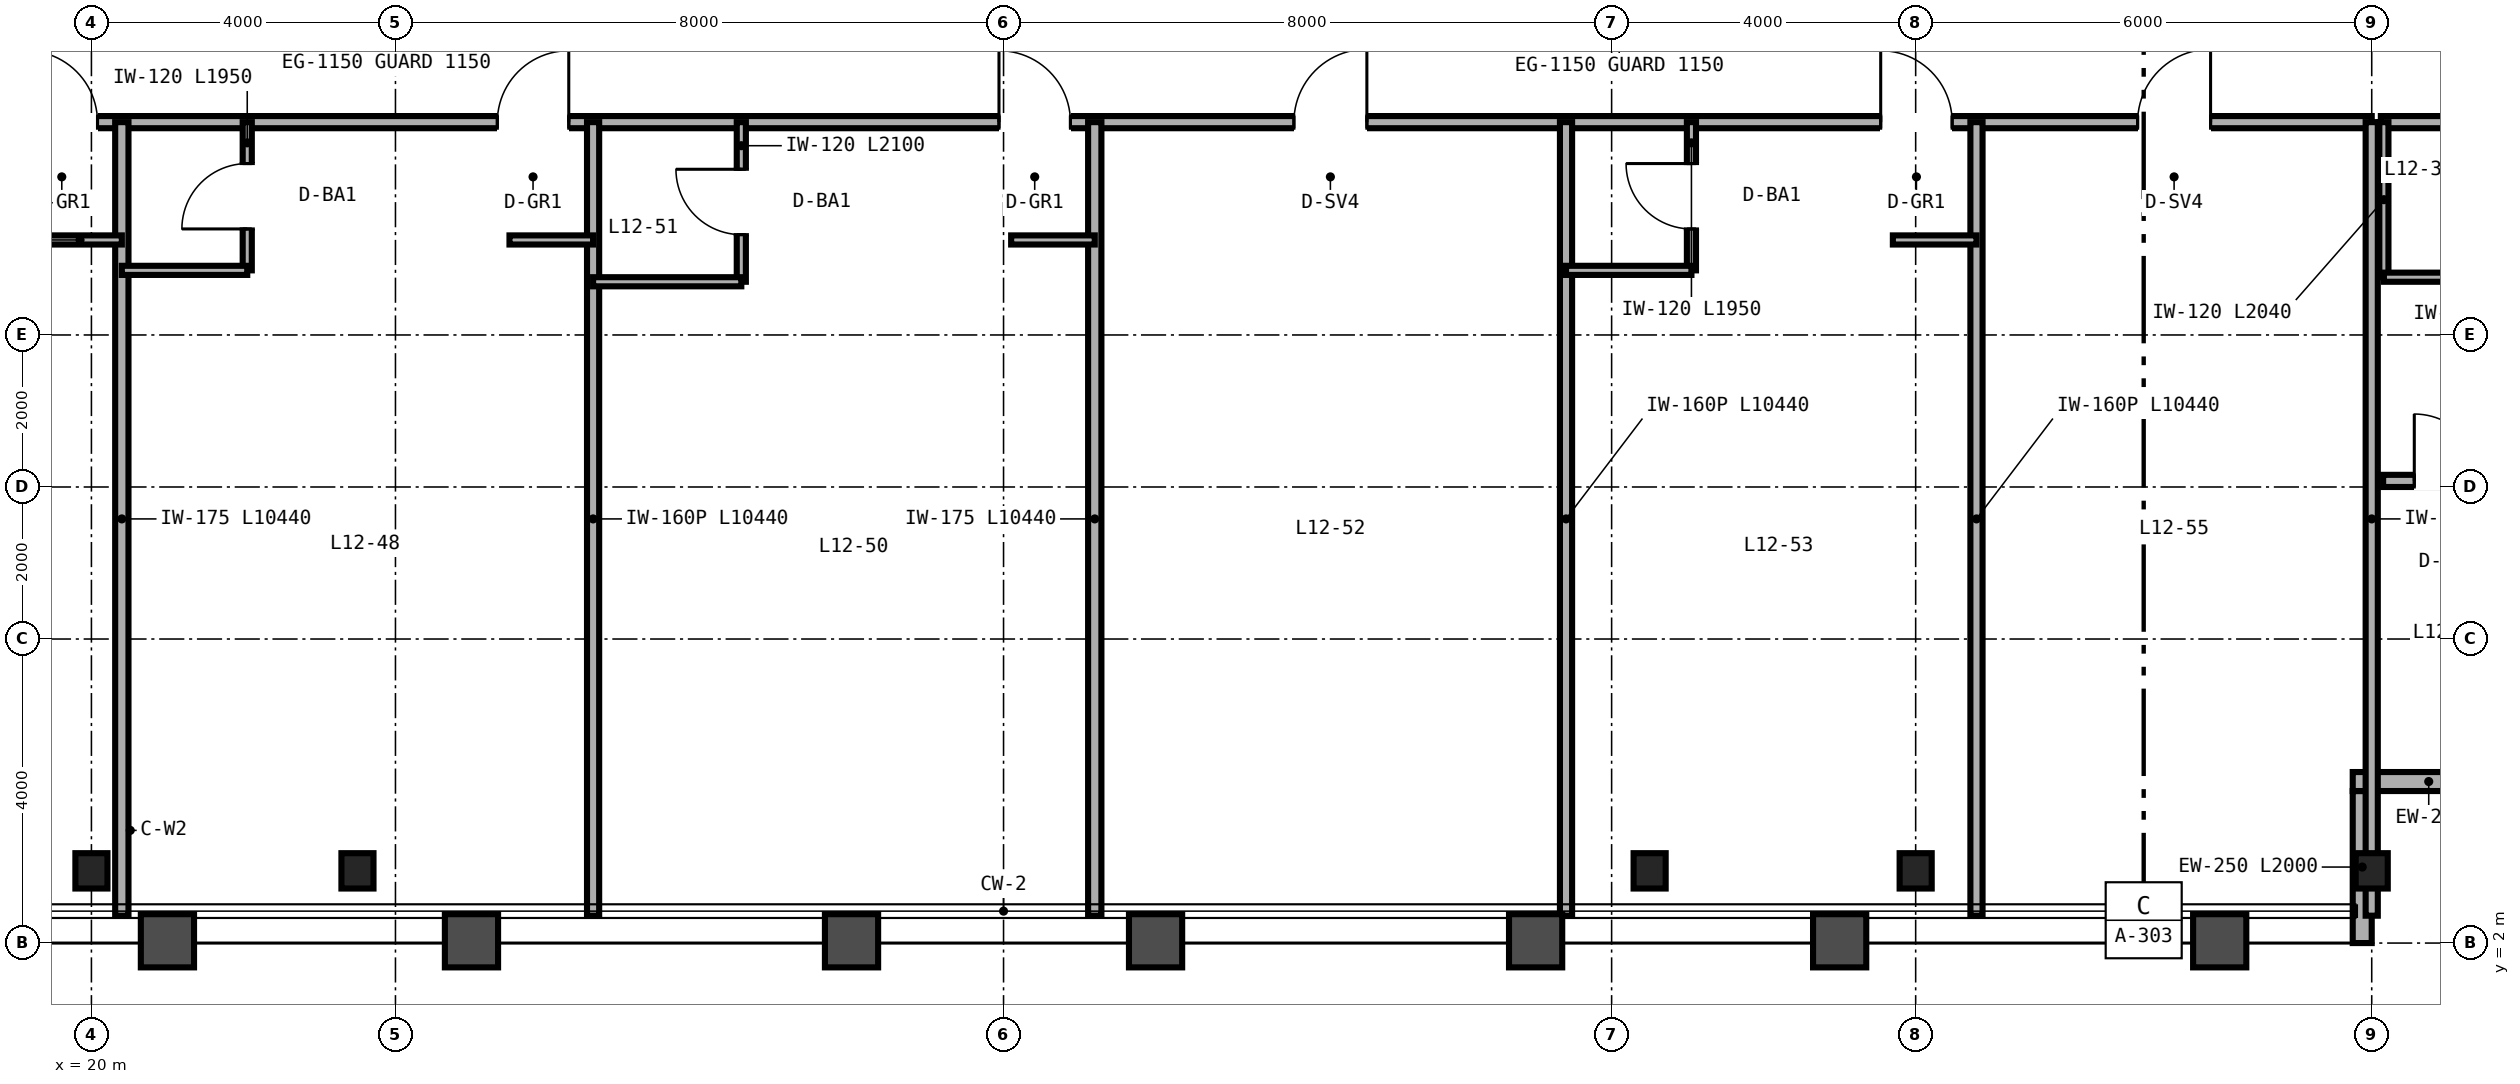
"""IFC4 building model, lengths in metres.
Left out: names, types, materials, properties, quantities, classifications, styles, units other than length and angle.
Written with IfcOpenShell. Run it as: python <this file> out.ifc"""

import sys

from ifc_helpers import new_model, si_unit, direction, frame, frame_2d, origin, origin_2d, place, context, subcontext, project, spatial, rectangle, i_section, extrude, source, transform, mapped, element, fill, save


model = new_model("IFC4")
c1 = context("Model", 3, precision=1e-05, world=origin(), true_north=direction((0.0, 1.0)))
c2 = subcontext(c1, "Body", "Model", "MODEL_VIEW")
j1 = project(units=[si_unit("LENGTHUNIT", "METRE"), si_unit("PLANEANGLEUNIT", "RADIAN")], contexts=[c1])
p1 = place(None, origin())
s1 = spatial("IfcSite", under=j1, at=p1, CompositionType="ELEMENT")
p2 = place(p1, origin())
s2 = spatial("IfcBuilding", under=s1, at=p2, CompositionType="ELEMENT")
p3 = place(p2, frame((0.0, 0.0, 52.8)))
s3 = spatial("IfcBuildingStorey", under=s2, at=p3, CompositionType="ELEMENT", Elevation=52.8)
m1 = source(origin(), c2, "Body", "SweptSolid", [
    extrude(i_section(OverallWidth=0.422, OverallDepth=0.465, WebThickness=0.045, FlangeThickness=0.073, FilletRadius=0.025, at=origin_2d()), origin(), (0.0, 0.0, 1.0), 3.35),
])
for number, where, z_axis, x_axis in (
    (1, (20.0, 2.95, 0.0), (0.0, 0.0, 1.0), (1.0, 0.0, 0.0)),
    (2, (23.5, 2.95, 0.0), (0.0, 0.0, 1.0), (1.0, 0.0, 0.0)),
    (3, (40.5, 2.95, 0.0), (0.0, 0.0, 1.0), (1.0, 0.0, 0.0)),
    (4, (44.0, 2.95, 0.0), (0.0, 0.0, 1.0), (1.0, 0.0, 0.0)),
    (5, (50.0, 2.95, 0.0), (0.0, 0.0, 1.0), (1.0, 0.0, 0.0)),
):
    element("IfcColumn", number, at=place(p3, frame(where, z_axis=z_axis, x_axis=x_axis)), inside=s3, PredefinedType="COLUMN", context=c2, shape_type="MappedRepresentation", body=[
        mapped(m1, transform((0.0, 0.0, 0.0), scale=1.0)),
    ])
p4 = place(p3, frame((49.875, 2.0, 0.0), z_axis=(0.0, 0.0, 1.0), x_axis=(0.0, 1.0, 0.0)))
e6 = element("IfcWall", 6, at=p4, inside=s3, PredefinedType="SOLIDWALL", context=c2, shape_type="SweptSolid", body=[
    extrude(rectangle(XDim=2.0, YDim=0.25, at=frame_2d((1.0, 0.0))), origin(), (0.0, 0.0, 1.0), 2.657),
])
p5 = place(p3, frame((49.75, 4.125, 0.0), z_axis=(0.0, 0.0, 1.0), x_axis=(1.0, 0.0, 0.0)))
e7 = element("IfcWall", 7, at=p5, inside=s3, PredefinedType="SOLIDWALL", context=c2, shape_type="SweptSolid", body=[
    extrude(rectangle(XDim=2.0, YDim=0.25, at=frame_2d((1.0, 0.0))), origin(), (0.0, 0.0, 1.0), 3.35),
])
p6 = place(p3, frame((50.12, 12.8, 0.0), z_axis=(0.0, 0.0, 1.0), x_axis=(1.0, 0.0, 0.0)))
e8 = element("IfcWall", 8, at=p6, inside=s3, PredefinedType="PARTITIONING", context=c2, shape_type="SweptSolid", body=[
    extrude(rectangle(XDim=5.68, YDim=0.16, at=frame_2d((2.84, 0.0))), origin(), (0.0, 0.0, 1.0), 3.35),
])
p7 = place(p6, frame((3.15, 0.0, 0.0)))
e9 = element("IfcOpeningElement", 9, at=p7, cuts=e8, PredefinedType="OPENING", context=c2, shape_type="SweptSolid", body=[
    extrude(rectangle(XDim=0.94, YDim=2.15, at=frame_2d((0.47, 1.075))), frame((0.0, 0.09, 0.0), z_axis=(0.0, -1.0, 0.0), x_axis=(1.0, 0.0, 0.0)), (0.0, 0.0, 1.0), 0.18),
])
p8 = place(p3, frame((50.16, 10.76, 0.0), z_axis=(0.0, 0.0, 1.0), x_axis=(0.0, 1.0, 0.0)))
e10 = element("IfcWall", 10, at=p8, inside=s3, PredefinedType="PARTITIONING", context=c2, shape_type="SweptSolid", body=[
    extrude(rectangle(XDim=2.04, YDim=0.12, at=frame_2d((1.02, 0.0))), origin(), (0.0, 0.0, 1.0), 3.35),
])
p9 = place(p3, frame((50.16, 10.76, 0.0), z_axis=(0.0, 0.0, 1.0), x_axis=(1.0, 0.0, 0.0)))
e11 = element("IfcWall", 11, at=p9, inside=s3, PredefinedType="PARTITIONING", context=c2, shape_type="SweptSolid", body=[
    extrude(rectangle(XDim=1.65, YDim=0.12, at=frame_2d((0.825, 0.0))), origin(), (0.0, 0.0, 1.0), 3.35),
])
p10 = place(p3, frame((50.15, 8.08, 0.0), z_axis=(0.0, 0.0, 1.0), x_axis=(1.0, 0.0, 0.0)))
e12 = element("IfcWall", 12, at=p10, inside=s3, PredefinedType="PARTITIONING", context=c2, shape_type="SweptSolid", body=[
    extrude(rectangle(XDim=1.7, YDim=0.16, at=frame_2d((0.85, 0.0))), origin(), (0.0, 0.0, 1.0), 3.35),
])
p11 = place(p10, frame((0.41, 0.0, 0.0)))
e13 = element("IfcOpeningElement", 13, at=p11, cuts=e12, PredefinedType="OPENING", context=c2, shape_type="SweptSolid", body=[
    extrude(rectangle(XDim=0.88, YDim=2.15, at=frame_2d((0.44, 1.075))), frame((0.0, 0.09, 0.0), z_axis=(0.0, -1.0, 0.0), x_axis=(1.0, 0.0, 0.0)), (0.0, 0.0, 1.0), 0.18),
])
p12 = place(p3, frame((14.0, 12.8, 0.0), z_axis=(0.0, 0.0, 1.0), x_axis=(1.0, 0.0, 0.0)))
e14 = element("IfcWall", 14, at=p12, inside=s3, PredefinedType="PARTITIONING", context=c2, shape_type="SweptSolid", body=[
    extrude(rectangle(XDim=36.0, YDim=0.16, at=frame_2d((18.0, 0.0))), origin(), (0.0, 0.0, 1.0), 2.571),
])
p13 = place(p12, frame((5.14, 0.0, 0.0)))
e15 = element("IfcOpeningElement", 15, at=p13, cuts=e14, PredefinedType="OPENING", context=c2, shape_type="SweptSolid", body=[
    extrude(rectangle(XDim=0.94, YDim=2.15, at=frame_2d((0.47, 1.075))), frame((0.0, 0.09, 0.0), z_axis=(0.0, -1.0, 0.0), x_axis=(1.0, 0.0, 0.0)), (0.0, 0.0, 1.0), 0.18),
])
p14 = place(p12, frame((11.34, 0.0, 0.0)))
e16 = element("IfcOpeningElement", 16, at=p14, cuts=e14, PredefinedType="OPENING", context=c2, shape_type="SweptSolid", body=[
    extrude(rectangle(XDim=0.94, YDim=2.15, at=frame_2d((0.47, 1.075))), frame((0.0, 0.09, 0.0), z_axis=(0.0, -1.0, 0.0), x_axis=(1.0, 0.0, 0.0)), (0.0, 0.0, 1.0), 0.18),
])
p15 = place(p12, frame((17.94, 0.0, 0.0)))
e17 = element("IfcOpeningElement", 17, at=p15, cuts=e14, PredefinedType="OPENING", context=c2, shape_type="SweptSolid", body=[
    extrude(rectangle(XDim=0.94, YDim=2.15, at=frame_2d((0.47, 1.075))), frame((0.0, 0.09, 0.0), z_axis=(0.0, -1.0, 0.0), x_axis=(1.0, 0.0, 0.0)), (0.0, 0.0, 1.0), 0.18),
])
p16 = place(p12, frame((21.82, 0.0, 0.0)))
e18 = element("IfcOpeningElement", 18, at=p16, cuts=e14, PredefinedType="OPENING", context=c2, shape_type="SweptSolid", body=[
    extrude(rectangle(XDim=0.96, YDim=2.15, at=frame_2d((0.48, 1.075))), frame((0.0, 0.09, 0.0), z_axis=(0.0, -1.0, 0.0), x_axis=(1.0, 0.0, 0.0)), (0.0, 0.0, 1.0), 0.18),
])
p17 = place(p12, frame((29.54, 0.0, 0.0)))
e19 = element("IfcOpeningElement", 19, at=p17, cuts=e14, PredefinedType="OPENING", context=c2, shape_type="SweptSolid", body=[
    extrude(rectangle(XDim=0.94, YDim=2.15, at=frame_2d((0.47, 1.075))), frame((0.0, 0.09, 0.0), z_axis=(0.0, -1.0, 0.0), x_axis=(1.0, 0.0, 0.0)), (0.0, 0.0, 1.0), 0.18),
])
p18 = place(p12, frame((32.92, 0.0, 0.0)))
e20 = element("IfcOpeningElement", 20, at=p18, cuts=e14, PredefinedType="OPENING", context=c2, shape_type="SweptSolid", body=[
    extrude(rectangle(XDim=0.96, YDim=2.15, at=frame_2d((0.48, 1.075))), frame((0.0, 0.09, 0.0), z_axis=(0.0, -1.0, 0.0), x_axis=(1.0, 0.0, 0.0)), (0.0, 0.0, 1.0), 0.18),
])
p19 = place(p3, frame((50.0, 2.36, 0.0), z_axis=(0.0, 0.0, 1.0), x_axis=(0.0, 1.0, 0.0)))
e21 = element("IfcWall", 21, at=p19, inside=s3, PredefinedType="PARTITIONING", context=c2, shape_type="SweptSolid", body=[
    extrude(rectangle(XDim=10.44, YDim=0.16, at=frame_2d((5.22, 0.0))), origin(), (0.0, 0.0, 1.0), 2.657),
])
p20 = place(p3, frame((20.4, 2.36, 0.0), z_axis=(0.0, 0.0, 1.0), x_axis=(0.0, 1.0, 0.0)))
e22 = element("IfcWall", 22, at=p20, inside=s3, PredefinedType="PARTITIONING", context=c2, shape_type="SweptSolid", body=[
    extrude(rectangle(XDim=10.44, YDim=0.175, at=frame_2d((5.22, 0.0))), origin(), (0.0, 0.0, 1.0), 2.813),
])
p21 = place(p3, frame((19.3, 11.25, 0.0), z_axis=(0.0, 0.0, 1.0), x_axis=(1.0, 0.0, 0.0)))
e23 = element("IfcWall", 23, at=p21, inside=s3, PredefinedType="PARTITIONING", context=c2, shape_type="SweptSolid", body=[
    extrude(rectangle(XDim=1.1, YDim=0.12, at=frame_2d((0.55, 0.0))), origin(), (0.0, 0.0, 1.0), 3.35),
])
p22 = place(p3, frame((26.6, 2.36, 0.0), z_axis=(0.0, 0.0, 1.0), x_axis=(0.0, 1.0, 0.0)))
e24 = element("IfcWall", 24, at=p22, inside=s3, PredefinedType="PARTITIONING", context=c2, shape_type="SweptSolid", body=[
    extrude(rectangle(XDim=10.44, YDim=0.16, at=frame_2d((5.22, 0.0))), origin(), (0.0, 0.0, 1.0), 2.423),
])
p23 = place(p3, frame((22.05, 10.85, 0.0), z_axis=(0.0, 0.0, 1.0), x_axis=(0.0, 1.0, 0.0)))
e25 = element("IfcWall", 25, at=p23, inside=s3, PredefinedType="PARTITIONING", context=c2, shape_type="SweptSolid", body=[
    extrude(rectangle(XDim=1.95, YDim=0.12, at=frame_2d((0.975, 0.0))), origin(), (0.0, 0.0, 1.0), 3.35),
])
p24 = place(p23, frame((0.545, 0.0, 0.0)))
e26 = element("IfcOpeningElement", 26, at=p24, cuts=e25, PredefinedType="OPENING", context=c2, shape_type="SweptSolid", body=[
    extrude(rectangle(XDim=0.86, YDim=2.1, at=frame_2d((0.43, 1.05))), frame((0.0, 0.07, 0.0), z_axis=(0.0, -1.0, 0.0), x_axis=(1.0, 0.0, 0.0)), (0.0, 0.0, 1.0), 0.14),
])
p25 = place(p3, frame((20.4, 10.85, 0.0), z_axis=(0.0, 0.0, 1.0), x_axis=(1.0, 0.0, 0.0)))
e27 = element("IfcWall", 27, at=p25, inside=s3, PredefinedType="PARTITIONING", context=c2, shape_type="SweptSolid", body=[
    extrude(rectangle(XDim=1.65, YDim=0.12, at=frame_2d((0.825, 0.0))), origin(), (0.0, 0.0, 1.0), 3.35),
])
p26 = place(p3, frame((25.5, 11.25, 0.0), z_axis=(0.0, 0.0, 1.0), x_axis=(1.0, 0.0, 0.0)))
e28 = element("IfcWall", 28, at=p26, inside=s3, PredefinedType="PARTITIONING", context=c2, shape_type="SweptSolid", body=[
    extrude(rectangle(XDim=1.1, YDim=0.12, at=frame_2d((0.55, 0.0))), origin(), (0.0, 0.0, 1.0), 3.35),
])
p27 = place(p3, frame((33.2, 2.36, 0.0), z_axis=(0.0, 0.0, 1.0), x_axis=(0.0, 1.0, 0.0)))
e29 = element("IfcWall", 29, at=p27, inside=s3, PredefinedType="PARTITIONING", context=c2, shape_type="SweptSolid", body=[
    extrude(rectangle(XDim=10.44, YDim=0.175, at=frame_2d((5.22, 0.0))), origin(), (0.0, 0.0, 1.0), 2.423),
])
p28 = place(p3, frame((28.55, 10.7, 0.0), z_axis=(0.0, 0.0, 1.0), x_axis=(0.0, 1.0, 0.0)))
e30 = element("IfcWall", 30, at=p28, inside=s3, PredefinedType="PARTITIONING", context=c2, shape_type="SweptSolid", body=[
    extrude(rectangle(XDim=2.1, YDim=0.12, at=frame_2d((1.05, 0.0))), origin(), (0.0, 0.0, 1.0), 3.35),
])
p29 = place(p28, frame((0.62, 0.0, 0.0)))
e31 = element("IfcOpeningElement", 31, at=p29, cuts=e30, PredefinedType="OPENING", context=c2, shape_type="SweptSolid", body=[
    extrude(rectangle(XDim=0.86, YDim=2.1, at=frame_2d((0.43, 1.05))), frame((0.0, 0.07, 0.0), z_axis=(0.0, -1.0, 0.0), x_axis=(1.0, 0.0, 0.0)), (0.0, 0.0, 1.0), 0.14),
])
p30 = place(p3, frame((26.6, 10.7, 0.0), z_axis=(0.0, 0.0, 1.0), x_axis=(1.0, 0.0, 0.0)))
e32 = element("IfcWall", 32, at=p30, inside=s3, PredefinedType="PARTITIONING", context=c2, shape_type="SweptSolid", body=[
    extrude(rectangle(XDim=1.95, YDim=0.12, at=frame_2d((0.975, 0.0))), origin(), (0.0, 0.0, 1.0), 3.35),
])
p31 = place(p3, frame((32.1, 11.25, 0.0), z_axis=(0.0, 0.0, 1.0), x_axis=(1.0, 0.0, 0.0)))
e33 = element("IfcWall", 33, at=p31, inside=s3, PredefinedType="PARTITIONING", context=c2, shape_type="SweptSolid", body=[
    extrude(rectangle(XDim=1.1, YDim=0.12, at=frame_2d((0.55, 0.0))), origin(), (0.0, 0.0, 1.0), 3.35),
])
p32 = place(p3, frame((39.4, 2.36, 0.0), z_axis=(0.0, 0.0, 1.0), x_axis=(0.0, 1.0, 0.0)))
e34 = element("IfcWall", 34, at=p32, inside=s3, PredefinedType="PARTITIONING", context=c2, shape_type="SweptSolid", body=[
    extrude(rectangle(XDim=10.44, YDim=0.16, at=frame_2d((5.22, 0.0))), origin(), (0.0, 0.0, 1.0), 2.423),
])
p33 = place(p3, frame((44.8, 2.36, 0.0), z_axis=(0.0, 0.0, 1.0), x_axis=(0.0, 1.0, 0.0)))
e35 = element("IfcWall", 35, at=p33, inside=s3, PredefinedType="PARTITIONING", context=c2, shape_type="SweptSolid", body=[
    extrude(rectangle(XDim=10.44, YDim=0.16, at=frame_2d((5.22, 0.0))), origin(), (0.0, 0.0, 1.0), 2.657),
])
p34 = place(p3, frame((41.05, 10.85, 0.0), z_axis=(0.0, 0.0, 1.0), x_axis=(0.0, 1.0, 0.0)))
e36 = element("IfcWall", 36, at=p34, inside=s3, PredefinedType="PARTITIONING", context=c2, shape_type="SweptSolid", body=[
    extrude(rectangle(XDim=1.95, YDim=0.12, at=frame_2d((0.975, 0.0))), origin(), (0.0, 0.0, 1.0), 3.35),
])
p35 = place(p34, frame((0.545, 0.0, 0.0)))
e37 = element("IfcOpeningElement", 37, at=p35, cuts=e36, PredefinedType="OPENING", context=c2, shape_type="SweptSolid", body=[
    extrude(rectangle(XDim=0.86, YDim=2.1, at=frame_2d((0.43, 1.05))), frame((0.0, 0.07, 0.0), z_axis=(0.0, -1.0, 0.0), x_axis=(1.0, 0.0, 0.0)), (0.0, 0.0, 1.0), 0.14),
])
p36 = place(p3, frame((39.4, 10.85, 0.0), z_axis=(0.0, 0.0, 1.0), x_axis=(1.0, 0.0, 0.0)))
e38 = element("IfcWall", 38, at=p36, inside=s3, PredefinedType="PARTITIONING", context=c2, shape_type="SweptSolid", body=[
    extrude(rectangle(XDim=1.65, YDim=0.12, at=frame_2d((0.825, 0.0))), origin(), (0.0, 0.0, 1.0), 2.571),
])
p37 = place(p3, frame((43.7, 11.25, 0.0), z_axis=(0.0, 0.0, 1.0), x_axis=(1.0, 0.0, 0.0)))
e39 = element("IfcWall", 39, at=p37, inside=s3, PredefinedType="PARTITIONING", context=c2, shape_type="SweptSolid", body=[
    extrude(rectangle(XDim=1.1, YDim=0.12, at=frame_2d((0.55, 0.0))), origin(), (0.0, 0.0, 1.0), 3.35),
])
m2 = source(origin(), c2, "Body", "SweptSolid", [
    extrude(rectangle(XDim=0.88, YDim=2.15, at=frame_2d((0.44, 1.075))), frame((0.0, 0.025, 0.0), z_axis=(0.0, -1.0, 0.0), x_axis=(1.0, 0.0, 0.0)), (0.0, 0.0, 1.0), 0.05),
])
p38 = place(p11, origin())
e40 = element("IfcDoor", 40, at=p38, inside=s3, OperationType="SINGLE_SWING_LEFT", PredefinedType="DOOR", context=c2, shape_type="MappedRepresentation", body=[
    mapped(m2, transform((0.0, 0.0, 0.0), scale=1.0)),
])
fill(e13, e40)
m3 = source(origin(), c2, "Body", "SweptSolid", [
    extrude(rectangle(XDim=0.86, YDim=2.1, at=frame_2d((0.43, 1.05))), frame((0.0, 0.025, 0.0), z_axis=(0.0, -1.0, 0.0), x_axis=(1.0, 0.0, 0.0)), (0.0, 0.0, 1.0), 0.05),
])
p39 = place(p24, origin())
e41 = element("IfcDoor", 41, at=p39, inside=s3, OperationType="SINGLE_SWING_LEFT", PredefinedType="DOOR", context=c2, shape_type="MappedRepresentation", body=[
    mapped(m3, transform((0.0, 0.0, 0.0), scale=1.0)),
])
fill(e26, e41)
p40 = place(p29, origin())
e42 = element("IfcDoor", 42, at=p40, inside=s3, OperationType="SINGLE_SWING_RIGHT", PredefinedType="DOOR", context=c2, shape_type="MappedRepresentation", body=[
    mapped(m3, transform((0.0, 0.0, 0.0), scale=1.0)),
])
fill(e31, e42)
p41 = place(p35, origin())
e43 = element("IfcDoor", 43, at=p41, inside=s3, OperationType="SINGLE_SWING_RIGHT", PredefinedType="DOOR", context=c2, shape_type="MappedRepresentation", body=[
    mapped(m3, transform((0.0, 0.0, 0.0), scale=1.0)),
])
fill(e37, e43)
m4 = source(origin(), c2, "Body", "SweptSolid", [
    extrude(rectangle(XDim=0.94, YDim=2.15, at=frame_2d((0.47, 1.075))), frame((0.0, 0.025, 0.0), z_axis=(0.0, -1.0, 0.0), x_axis=(1.0, 0.0, 0.0)), (0.0, 0.0, 1.0), 0.05),
])
p42 = place(p13, origin())
e44 = element("IfcDoor", 44, at=p42, inside=s3, OperationType="SINGLE_SWING_LEFT", PredefinedType="DOOR", context=c2, shape_type="MappedRepresentation", body=[
    mapped(m4, transform((0.0, 0.0, 0.0), scale=1.0)),
])
fill(e15, e44)
p43 = place(p14, origin())
e45 = element("IfcDoor", 45, at=p43, inside=s3, OperationType="SINGLE_SWING_RIGHT", PredefinedType="DOOR", context=c2, shape_type="MappedRepresentation", body=[
    mapped(m4, transform((0.0, 0.0, 0.0), scale=1.0)),
])
fill(e16, e45)
p44 = place(p15, origin())
e46 = element("IfcDoor", 46, at=p44, inside=s3, OperationType="SINGLE_SWING_LEFT", PredefinedType="DOOR", context=c2, shape_type="MappedRepresentation", body=[
    mapped(m4, transform((0.0, 0.0, 0.0), scale=1.0)),
])
fill(e17, e46)
m5 = source(origin(), c2, "Body", "SweptSolid", [
    extrude(rectangle(XDim=0.96, YDim=2.15, at=frame_2d((0.48, 1.075))), frame((0.0, 0.025, 0.0), z_axis=(0.0, -1.0, 0.0), x_axis=(1.0, 0.0, 0.0)), (0.0, 0.0, 1.0), 0.05),
])
p45 = place(p16, origin())
e47 = element("IfcDoor", 47, at=p45, inside=s3, OperationType="SINGLE_SWING_RIGHT", PredefinedType="DOOR", context=c2, shape_type="MappedRepresentation", body=[
    mapped(m5, transform((0.0, 0.0, 0.0), scale=1.0)),
])
fill(e18, e47)
p46 = place(p17, origin())
e48 = element("IfcDoor", 48, at=p46, inside=s3, OperationType="SINGLE_SWING_LEFT", PredefinedType="DOOR", context=c2, shape_type="MappedRepresentation", body=[
    mapped(m4, transform((0.0, 0.0, 0.0), scale=1.0)),
])
fill(e19, e48)
p47 = place(p18, origin())
e49 = element("IfcDoor", 49, at=p47, inside=s3, OperationType="SINGLE_SWING_RIGHT", PredefinedType="DOOR", context=c2, shape_type="MappedRepresentation", body=[
    mapped(m5, transform((0.0, 0.0, 0.0), scale=1.0)),
])
fill(e20, e49)
save(model, sys.argv[1])
